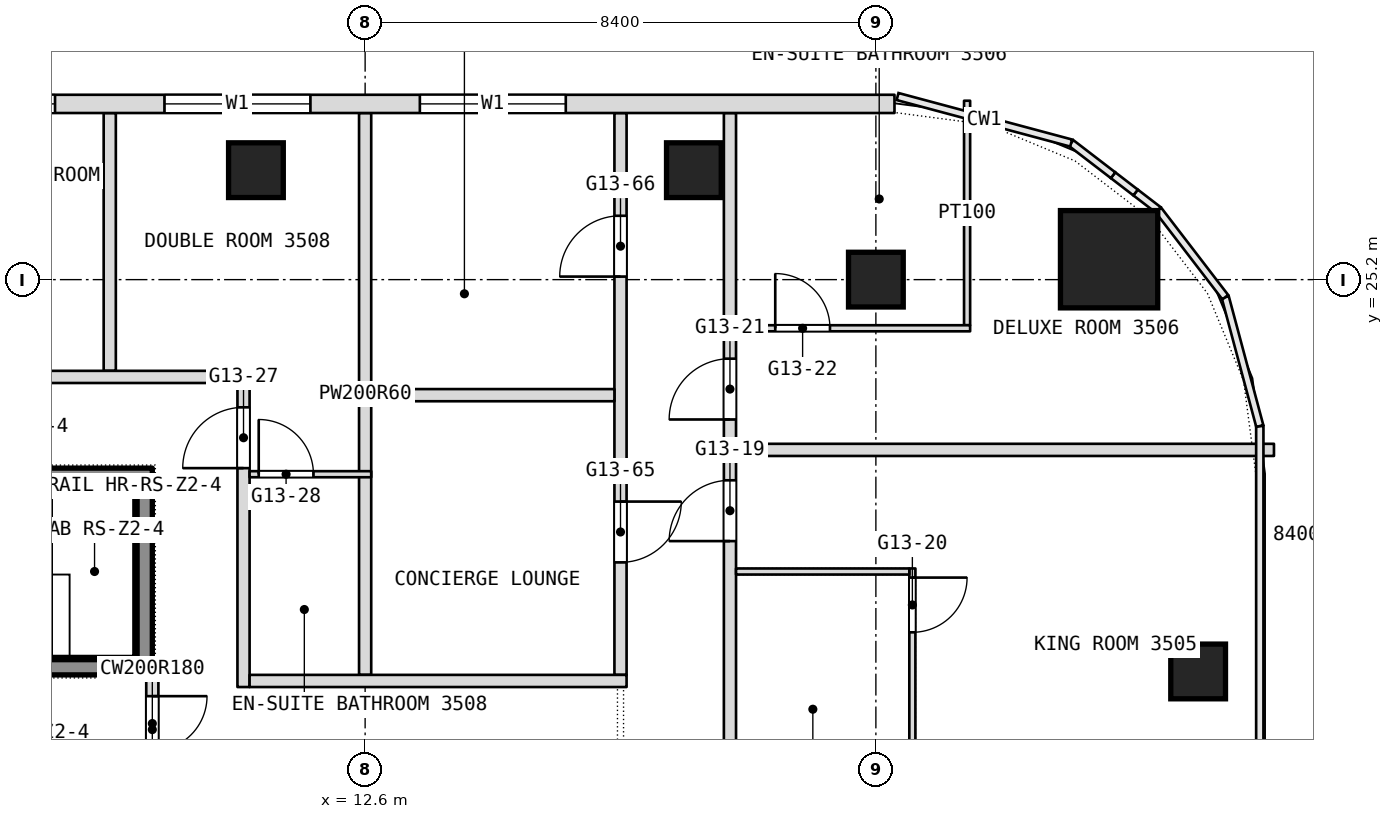
"""IFC4 building model, lengths in metres.
Left out: names, types, materials, properties, quantities, classifications, styles, units other than length and angle.
Written with IfcOpenShell. Run it as: python <this file> out.ifc"""

import sys

from ifc_helpers import new_model, si_unit, direction, frame, frame_2d, origin, origin_2d, place, context, subcontext, project, spatial, rectangle, extrude, element, fill, save


model = new_model("IFC4")
c1 = context("Model", 3, precision=1e-05, world=origin(), true_north=direction((0.0, 1.0)))
c2 = subcontext(c1, "Body", "Model", "MODEL_VIEW")
j1 = project(units=[si_unit("LENGTHUNIT", "METRE"), si_unit("PLANEANGLEUNIT", "RADIAN")], contexts=[c1])
p1 = place(None, origin())
s1 = spatial("IfcSite", under=j1, at=p1, CompositionType="ELEMENT")
p2 = place(p1, origin())
s2 = spatial("IfcBuilding", under=s1, at=p2, CompositionType="ELEMENT")
p3 = place(p2, frame((0.0, 0.0, 151.7)))
s3 = spatial("IfcBuildingStorey", under=s2, at=p3, CompositionType="ELEMENT", Elevation=151.7)
p4 = place(p3, frame((24.835, 25.535, 0.0), z_axis=(0.0, 0.0, 1.0), x_axis=(1.0, 0.0, 0.0)))
e1 = element("IfcColumn", 1, at=p4, inside=s3, PredefinedType="COLUMN", context=c2, shape_type="SweptSolid", body=[
    extrude(rectangle(XDim=1.6, YDim=1.6, at=origin_2d()), origin(), (0.0, 0.0, 1.0), 3.6),
])
for number, where, z_axis, x_axis in (
    (2, (21.0, 25.2, 0.0), (0.0, 0.0, 1.0), (1.0, 0.0, 0.0)),
    (3, (10.804, 27.0, 0.0), (0.0, 0.0, 1.0), (1.0, 0.0, 0.0)),
    (4, (18.007, 27.0, 0.0), (0.0, 0.0, 1.0), (1.0, 0.0, 0.0)),
    (5, (26.3, 18.756, 0.0), (0.0, 0.0, 1.0), (1.0, 0.0, 0.0)),
):
    element("IfcColumn", number, at=place(p3, frame(where, z_axis=z_axis, x_axis=x_axis)), inside=s3, PredefinedType="COLUMN", context=c2, shape_type="SweptSolid", body=[
        extrude(rectangle(XDim=0.9, YDim=0.9, at=origin_2d()), origin(), (0.0, 0.0, 1.0), 3.6),
    ])
p5 = place(p3, frame((22.5, 24.45, 0.0), z_axis=(0.0, 0.0, 1.0), x_axis=(0.0, 1.0, 0.0)))
e6 = element("IfcWall", 6, at=p5, inside=s3, PredefinedType="PARTITIONING", context=c2, shape_type="SweptSolid", body=[
    extrude(rectangle(XDim=3.692, YDim=0.1, at=frame_2d((1.846, 0.0))), origin(), (0.0, 0.0, 1.0), 3.34),
])
p6 = place(p3, frame((21.6, 16.9, 0.0), z_axis=(0.0, 0.0, 1.0), x_axis=(0.0, 1.0, 0.0)))
e7 = element("IfcWall", 7, at=p6, inside=s3, PredefinedType="PARTITIONING", context=c2, shape_type="SweptSolid", body=[
    extrude(rectangle(XDim=3.55, YDim=0.1, at=frame_2d((1.775, 0.0))), origin(), (0.0, 0.0, 1.0), 3.34),
])
p7 = place(p6, frame((2.5, 0.0, 0.0)))
e8 = element("IfcOpeningElement", 8, at=p7, cuts=e7, PredefinedType="OPENING", context=c2, shape_type="SweptSolid", body=[
    extrude(rectangle(XDim=0.9, YDim=2.1, at=frame_2d((0.45, 1.05))), frame((0.0, 0.05, 0.0), z_axis=(0.0, -1.0, 0.0), x_axis=(1.0, 0.0, 0.0)), (0.0, 0.0, 1.0), 0.1),
])
p8 = place(p3, frame((18.6, -21.708, 0.0), z_axis=(0.0, 0.0, 1.0), x_axis=(0.0, 1.0, 0.0)))
e9 = element("IfcWall", 9, at=p8, inside=s3, PredefinedType="PARTITIONING", context=c2, shape_type="SweptSolid", body=[
    extrude(rectangle(XDim=49.648, YDim=0.2, at=frame_2d((24.824, 0.0))), origin(), (0.0, 0.0, 1.0), 3.34),
])
p9 = place(p8, frame((2.8, 0.0, 0.0)))
e10 = element("IfcOpeningElement", 10, at=p9, cuts=e9, PredefinedType="OPENING", context=c2, shape_type="SweptSolid", body=[
    extrude(rectangle(XDim=1.0, YDim=2.1, at=frame_2d((0.5, 1.05))), frame((0.0, 0.1, 0.0), z_axis=(0.0, -1.0, 0.0), x_axis=(1.0, 0.0, 0.0)), (0.0, 0.0, 1.0), 0.2),
])
p10 = place(p8, frame((10.658, 0.0, 0.0)))
e11 = element("IfcOpeningElement", 11, at=p10, cuts=e9, PredefinedType="OPENING", context=c2, shape_type="SweptSolid", body=[
    extrude(rectangle(XDim=1.1, YDim=2.1, at=frame_2d((0.55, 1.05))), frame((0.0, 0.1, 0.0), z_axis=(0.0, -1.0, 0.0), x_axis=(1.0, 0.0, 0.0)), (0.0, 0.0, 1.0), 0.2),
])
p11 = place(p8, frame((16.608, 0.0, 0.0)))
e12 = element("IfcOpeningElement", 12, at=p11, cuts=e9, PredefinedType="OPENING", context=c2, shape_type="SweptSolid", body=[
    extrude(rectangle(XDim=1.8, YDim=2.1, at=frame_2d((0.9, 1.05))), frame((0.0, 0.1, 0.0), z_axis=(0.0, -1.0, 0.0), x_axis=(1.0, 0.0, 0.0)), (0.0, 0.0, 1.0), 0.2),
])
p12 = place(p8, frame((24.508, 0.0, 0.0)))
e13 = element("IfcOpeningElement", 13, at=p12, cuts=e9, PredefinedType="OPENING", context=c2, shape_type="SweptSolid", body=[
    extrude(rectangle(XDim=1.0, YDim=2.1, at=frame_2d((0.5, 1.05))), frame((0.0, 0.1, 0.0), z_axis=(0.0, -1.0, 0.0), x_axis=(1.0, 0.0, 0.0)), (0.0, 0.0, 1.0), 0.2),
])
p13 = place(p8, frame((26.308, 0.0, 0.0)))
e14 = element("IfcOpeningElement", 14, at=p13, cuts=e9, PredefinedType="OPENING", context=c2, shape_type="SweptSolid", body=[
    extrude(rectangle(XDim=1.0, YDim=2.1, at=frame_2d((0.5, 1.05))), frame((0.0, 0.1, 0.0), z_axis=(0.0, -1.0, 0.0), x_axis=(1.0, 0.0, 0.0)), (0.0, 0.0, 1.0), 0.2),
])
p14 = place(p8, frame((33.408, 0.0, 0.0)))
e15 = element("IfcOpeningElement", 15, at=p14, cuts=e9, PredefinedType="OPENING", context=c2, shape_type="SweptSolid", body=[
    extrude(rectangle(XDim=1.8, YDim=2.1, at=frame_2d((0.9, 1.05))), frame((0.0, 0.1, 0.0), z_axis=(0.0, -1.0, 0.0), x_axis=(1.0, 0.0, 0.0)), (0.0, 0.0, 1.0), 0.2),
])
p15 = place(p8, frame((42.608, 0.0, 0.0)))
e16 = element("IfcOpeningElement", 16, at=p15, cuts=e9, PredefinedType="OPENING", context=c2, shape_type="SweptSolid", body=[
    extrude(rectangle(XDim=1.0, YDim=2.1, at=frame_2d((0.5, 1.05))), frame((0.0, 0.1, 0.0), z_axis=(0.0, -1.0, 0.0), x_axis=(1.0, 0.0, 0.0)), (0.0, 0.0, 1.0), 0.2),
])
p16 = place(p8, frame((44.608, 0.0, 0.0)))
e17 = element("IfcOpeningElement", 17, at=p16, cuts=e9, PredefinedType="OPENING", context=c2, shape_type="SweptSolid", body=[
    extrude(rectangle(XDim=1.0, YDim=2.1, at=frame_2d((0.5, 1.05))), frame((0.0, 0.1, 0.0), z_axis=(0.0, -1.0, 0.0), x_axis=(1.0, 0.0, 0.0)), (0.0, 0.0, 1.0), 0.2),
])
p17 = place(p3, frame((16.8, 18.7, 0.0), z_axis=(0.0, 0.0, 1.0), x_axis=(0.0, 1.0, 0.0)))
e18 = element("IfcWall", 18, at=p17, inside=s3, PredefinedType="PARTITIONING", context=c2, shape_type="SweptSolid", body=[
    extrude(rectangle(XDim=9.24, YDim=0.2, at=frame_2d((4.62, 0.0))), origin(), (0.0, 0.0, 1.0), 3.34),
])
p18 = place(p17, frame((1.85, 0.0, 0.0)))
e19 = element("IfcOpeningElement", 19, at=p18, cuts=e18, PredefinedType="OPENING", context=c2, shape_type="SweptSolid", body=[
    extrude(rectangle(XDim=1.0, YDim=2.1, at=frame_2d((0.5, 1.05))), frame((0.0, 0.1, 0.0), z_axis=(0.0, -1.0, 0.0), x_axis=(1.0, 0.0, 0.0)), (0.0, 0.0, 1.0), 0.2),
])
p19 = place(p17, frame((6.55, 0.0, 0.0)))
e20 = element("IfcOpeningElement", 20, at=p19, cuts=e18, PredefinedType="OPENING", context=c2, shape_type="SweptSolid", body=[
    extrude(rectangle(XDim=1.0, YDim=2.1, at=frame_2d((0.5, 1.05))), frame((0.0, 0.1, 0.0), z_axis=(0.0, -1.0, 0.0), x_axis=(1.0, 0.0, 0.0)), (0.0, 0.0, 1.0), 0.2),
])
p20 = place(p3, frame((12.6, 18.7, 0.0), z_axis=(0.0, 0.0, 1.0), x_axis=(0.0, 1.0, 0.0)))
e21 = element("IfcWall", 21, at=p20, inside=s3, PredefinedType="PARTITIONING", context=c2, shape_type="SweptSolid", body=[
    extrude(rectangle(XDim=9.24, YDim=0.2, at=frame_2d((4.62, 0.0))), origin(), (0.0, 0.0, 1.0), 3.34),
])
p21 = place(p3, frame((10.6, 18.5, 0.0), z_axis=(0.0, 0.0, 1.0), x_axis=(0.0, 1.0, 0.0)))
e22 = element("IfcWall", 22, at=p21, inside=s3, PredefinedType="PARTITIONING", context=c2, shape_type="SweptSolid", body=[
    extrude(rectangle(XDim=5.0, YDim=0.2, at=frame_2d((2.5, 0.0))), origin(), (0.0, 0.0, 1.0), 3.34),
])
p22 = place(p21, frame((3.6, 0.0, 0.0)))
e23 = element("IfcOpeningElement", 23, at=p22, cuts=e22, PredefinedType="OPENING", context=c2, shape_type="SweptSolid", body=[
    extrude(rectangle(XDim=1.0, YDim=2.1, at=frame_2d((0.5, 1.05))), frame((0.0, 0.1, 0.0), z_axis=(0.0, -1.0, 0.0), x_axis=(1.0, 0.0, 0.0)), (0.0, 0.0, 1.0), 0.2),
])
p23 = place(p3, frame((9.1, 16.9, 0.0), z_axis=(0.0, 0.0, 1.0), x_axis=(0.0, 1.0, 0.0)))
e24 = element("IfcWall", 24, at=p23, inside=s3, PredefinedType="PARTITIONING", context=c2, shape_type="SweptSolid", body=[
    extrude(rectangle(XDim=1.8, YDim=0.2, at=frame_2d((0.9, 0.0))), origin(), (0.0, 0.0, 1.0), 3.34),
])
p24 = place(p23, frame((0.55, 0.0, 0.0)))
e25 = element("IfcOpeningElement", 25, at=p24, cuts=e24, PredefinedType="OPENING", context=c2, shape_type="SweptSolid", body=[
    extrude(rectangle(XDim=0.9, YDim=2.1, at=frame_2d((0.45, 1.05))), frame((0.0, 0.1, 0.0), z_axis=(0.0, -1.0, 0.0), x_axis=(1.0, 0.0, 0.0)), (0.0, 0.0, 1.0), 0.2),
])
p25 = place(p3, frame((8.4, 23.7, 0.0), z_axis=(0.0, 0.0, 1.0), x_axis=(0.0, 1.0, 0.0)))
e26 = element("IfcWall", 26, at=p25, inside=s3, PredefinedType="PARTITIONING", context=c2, shape_type="SweptSolid", body=[
    extrude(rectangle(XDim=4.24, YDim=0.2, at=frame_2d((2.12, 0.0))), origin(), (0.0, 0.0, 1.0), 3.34),
])
p26 = place(p3, frame((10.7, 18.6, 0.0), z_axis=(0.0, 0.0, 1.0), x_axis=(1.0, 0.0, 0.0)))
e27 = element("IfcWall", 27, at=p26, inside=s3, PredefinedType="PARTITIONING", context=c2, shape_type="SweptSolid", body=[
    extrude(rectangle(XDim=6.2, YDim=0.2, at=frame_2d((3.1, 0.0))), origin(), (0.0, 0.0, 1.0), 3.34),
])
p27 = place(p3, frame((18.7, 20.4, 0.0), z_axis=(0.0, 0.0, 1.0), x_axis=(1.0, 0.0, 0.0)))
e28 = element("IfcWall", 28, at=p27, inside=s3, PredefinedType="PARTITIONING", context=c2, shape_type="SweptSolid", body=[
    extrude(rectangle(XDim=2.85, YDim=0.1, at=frame_2d((1.425, 0.0))), origin(), (0.0, 0.0, 1.0), 3.34),
])
p28 = place(p3, frame((10.7, 22.0, 0.0), z_axis=(0.0, 0.0, 1.0), x_axis=(1.0, 0.0, 0.0)))
e29 = element("IfcWall", 29, at=p28, inside=s3, PredefinedType="PARTITIONING", context=c2, shape_type="SweptSolid", body=[
    extrude(rectangle(XDim=2.0, YDim=0.1, at=frame_2d((1.0, 0.0))), origin(), (0.0, 0.0, 1.0), 3.34),
])
p29 = place(p28, frame((0.15, 0.0, 0.0)))
e30 = element("IfcOpeningElement", 30, at=p29, cuts=e29, PredefinedType="OPENING", context=c2, shape_type="SweptSolid", body=[
    extrude(rectangle(XDim=0.9, YDim=2.1, at=frame_2d((0.45, 1.05))), frame((0.0, 0.05, 0.0), z_axis=(0.0, -1.0, 0.0), x_axis=(1.0, 0.0, 0.0)), (0.0, 0.0, 1.0), 0.1),
])
p30 = place(p3, frame((18.7, 22.4, 0.0), z_axis=(0.0, 0.0, 1.0), x_axis=(1.0, 0.0, 0.0)))
e31 = element("IfcWall", 31, at=p30, inside=s3, PredefinedType="PARTITIONING", context=c2, shape_type="SweptSolid", body=[
    extrude(rectangle(XDim=8.847, YDim=0.2, at=frame_2d((4.424, 0.0))), origin(), (0.0, 0.0, 1.0), 3.34),
])
p31 = place(p3, frame((12.7, 23.3, 0.0), z_axis=(0.0, 0.0, 1.0), x_axis=(1.0, 0.0, 0.0)))
e32 = element("IfcWall", 32, at=p31, inside=s3, PredefinedType="PARTITIONING", context=c2, shape_type="SweptSolid", body=[
    extrude(rectangle(XDim=4.0, YDim=0.2, at=frame_2d((2.0, 0.0))), origin(), (0.0, 0.0, 1.0), 3.34),
])
p32 = place(p3, frame((1.5, 23.6, 0.0), z_axis=(0.0, 0.0, 1.0), x_axis=(1.0, 0.0, 0.0)))
e33 = element("IfcWall", 33, at=p32, inside=s3, PredefinedType="PARTITIONING", context=c2, shape_type="SweptSolid", body=[
    extrude(rectangle(XDim=9.2, YDim=0.2, at=frame_2d((4.6, 0.0))), origin(), (0.0, 0.0, 1.0), 3.34),
])
p33 = place(p32, frame((4.3, 0.0, 0.0)))
e34 = element("IfcOpeningElement", 34, at=p33, cuts=e33, PredefinedType="OPENING", context=c2, shape_type="SweptSolid", body=[
    extrude(rectangle(XDim=1.0, YDim=2.1, at=frame_2d((0.5, 1.05))), frame((0.0, 0.1, 0.0), z_axis=(0.0, -1.0, 0.0), x_axis=(1.0, 0.0, 0.0)), (0.0, 0.0, 1.0), 0.2),
])
p34 = place(p3, frame((18.7, 24.4, 0.0), z_axis=(0.0, 0.0, 1.0), x_axis=(1.0, 0.0, 0.0)))
e35 = element("IfcWall", 35, at=p34, inside=s3, PredefinedType="PARTITIONING", context=c2, shape_type="SweptSolid", body=[
    extrude(rectangle(XDim=3.85, YDim=0.1, at=frame_2d((1.925, 0.0))), origin(), (0.0, 0.0, 1.0), 3.34),
])
p35 = place(p34, frame((0.645, 0.0, 0.0)))
e36 = element("IfcOpeningElement", 36, at=p35, cuts=e35, PredefinedType="OPENING", context=c2, shape_type="SweptSolid", body=[
    extrude(rectangle(XDim=0.9, YDim=2.1, at=frame_2d((0.45, 1.05))), frame((0.0, 0.05, 0.0), z_axis=(0.0, -1.0, 0.0), x_axis=(1.0, 0.0, 0.0)), (0.0, 0.0, 1.0), 0.1),
])
p36 = place(p3, frame((21.306, 28.09, 0.0), z_axis=(0.0, 0.0, 1.0), x_axis=(-1.0, 0.0, 0.0)))
e37 = element("IfcWall", 37, at=p36, inside=s3, PredefinedType="NOTDEFINED", context=c2, shape_type="SweptSolid", body=[
    extrude(rectangle(XDim=42.612, YDim=0.3, at=frame_2d((21.306, 0.0))), origin(), (0.0, 0.0, 1.0), 3.6),
])
p37 = place(p36, frame((5.406, 0.0, 0.9)))
e38 = element("IfcOpeningElement", 38, at=p37, cuts=e37, PredefinedType="OPENING", context=c2, shape_type="SweptSolid", body=[
    extrude(rectangle(XDim=2.4, YDim=2.1, at=frame_2d((1.2, 1.05))), frame((0.0, 0.15, 0.0), z_axis=(0.0, -1.0, 0.0), x_axis=(1.0, 0.0, 0.0)), (0.0, 0.0, 1.0), 0.3),
])
p38 = place(p36, frame((9.606, 0.0, 0.9)))
e39 = element("IfcOpeningElement", 39, at=p38, cuts=e37, PredefinedType="OPENING", context=c2, shape_type="SweptSolid", body=[
    extrude(rectangle(XDim=2.4, YDim=2.1, at=frame_2d((1.2, 1.05))), frame((0.0, 0.15, 0.0), z_axis=(0.0, -1.0, 0.0), x_axis=(1.0, 0.0, 0.0)), (0.0, 0.0, 1.0), 0.3),
])
p39 = place(p36, frame((13.806, 0.0, 0.9)))
e40 = element("IfcOpeningElement", 40, at=p39, cuts=e37, PredefinedType="OPENING", context=c2, shape_type="SweptSolid", body=[
    extrude(rectangle(XDim=2.4, YDim=2.1, at=frame_2d((1.2, 1.05))), frame((0.0, 0.15, 0.0), z_axis=(0.0, -1.0, 0.0), x_axis=(1.0, 0.0, 0.0)), (0.0, 0.0, 1.0), 0.3),
])
p40 = place(p36, frame((18.006, 0.0, 0.9)))
e41 = element("IfcOpeningElement", 41, at=p40, cuts=e37, PredefinedType="OPENING", context=c2, shape_type="SweptSolid", body=[
    extrude(rectangle(XDim=2.4, YDim=2.1, at=frame_2d((1.2, 1.05))), frame((0.0, 0.15, 0.0), z_axis=(0.0, -1.0, 0.0), x_axis=(1.0, 0.0, 0.0)), (0.0, 0.0, 1.0), 0.3),
])
p41 = place(p36, frame((22.206, 0.0, 0.9)))
e42 = element("IfcOpeningElement", 42, at=p41, cuts=e37, PredefinedType="OPENING", context=c2, shape_type="SweptSolid", body=[
    extrude(rectangle(XDim=2.4, YDim=2.1, at=frame_2d((1.2, 1.05))), frame((0.0, 0.15, 0.0), z_axis=(0.0, -1.0, 0.0), x_axis=(1.0, 0.0, 0.0)), (0.0, 0.0, 1.0), 0.3),
])
p42 = place(p36, frame((26.406, 0.0, 0.9)))
e43 = element("IfcOpeningElement", 43, at=p42, cuts=e37, PredefinedType="OPENING", context=c2, shape_type="SweptSolid", body=[
    extrude(rectangle(XDim=2.4, YDim=2.1, at=frame_2d((1.2, 1.05))), frame((0.0, 0.15, 0.0), z_axis=(0.0, -1.0, 0.0), x_axis=(1.0, 0.0, 0.0)), (0.0, 0.0, 1.0), 0.3),
])
p43 = place(p36, frame((30.606, 0.0, 0.9)))
e44 = element("IfcOpeningElement", 44, at=p43, cuts=e37, PredefinedType="OPENING", context=c2, shape_type="SweptSolid", body=[
    extrude(rectangle(XDim=2.4, YDim=2.1, at=frame_2d((1.2, 1.05))), frame((0.0, 0.15, 0.0), z_axis=(0.0, -1.0, 0.0), x_axis=(1.0, 0.0, 0.0)), (0.0, 0.0, 1.0), 0.3),
])
p44 = place(p36, frame((34.806, 0.0, 0.9)))
e45 = element("IfcOpeningElement", 45, at=p44, cuts=e37, PredefinedType="OPENING", context=c2, shape_type="SweptSolid", body=[
    extrude(rectangle(XDim=2.4, YDim=2.1, at=frame_2d((1.2, 1.05))), frame((0.0, 0.15, 0.0), z_axis=(0.0, -1.0, 0.0), x_axis=(1.0, 0.0, 0.0)), (0.0, 0.0, 1.0), 0.3),
])
p45 = place(p3, frame((2.9, 18.825, 0.1), z_axis=(0.0, 0.0, 1.0), x_axis=(1.0, 0.0, 0.0)))
e46 = element("IfcWall", 46, at=p45, inside=s3, PredefinedType="SHEAR", context=c2, shape_type="SweptSolid", body=[
    extrude(rectangle(XDim=6.2, YDim=0.25, at=frame_2d((3.1, 0.0))), origin(), (0.0, 0.0, 1.0), 3.6),
])
p46 = place(p45, frame((0.45, 0.0, 0.0)))
e47 = element("IfcOpeningElement", 47, at=p46, cuts=e46, PredefinedType="OPENING", context=c2, shape_type="SweptSolid", body=[
    extrude(rectangle(XDim=1.0, YDim=2.1, at=frame_2d((0.5, 1.05))), frame((0.0, 0.125, 0.0), z_axis=(0.0, -1.0, 0.0), x_axis=(1.0, 0.0, 0.0)), (0.0, 0.0, 1.0), 0.25),
])
p47 = place(p3, frame((2.9, 21.975, 0.1), z_axis=(0.0, 0.0, 1.0), x_axis=(1.0, 0.0, 0.0)))
e48 = element("IfcWall", 48, at=p47, inside=s3, PredefinedType="SHEAR", context=c2, shape_type="SweptSolid", body=[
    extrude(rectangle(XDim=6.2, YDim=0.25, at=frame_2d((3.1, 0.0))), origin(), (0.0, 0.0, 1.0), 3.6),
])
p48 = place(p3, frame((8.975, 18.95, 0.1), z_axis=(0.0, 0.0, 1.0), x_axis=(0.0, 1.0, 0.0)))
e49 = element("IfcWall", 49, at=p48, inside=s3, PredefinedType="SHEAR", context=c2, shape_type="SweptSolid", body=[
    extrude(rectangle(XDim=2.9, YDim=0.25, at=frame_2d((1.45, 0.0))), origin(), (0.0, 0.0, 1.0), 3.6),
])
p49 = place(p7, origin())
e50 = element("IfcDoor", 50, at=p49, inside=s3, OperationType="SINGLE_SWING_RIGHT", PredefinedType="DOOR", context=c2, shape_type="SweptSolid", body=[
    extrude(rectangle(XDim=0.9, YDim=2.1, at=frame_2d((0.45, 1.05))), frame((0.0, 0.025, 0.0), z_axis=(0.0, -1.0, 0.0), x_axis=(1.0, 0.0, 0.0)), (0.0, 0.0, 1.0), 0.05),
])
fill(e8, e50)
p50 = place(p15, origin())
e51 = element("IfcDoor", 51, at=p50, inside=s3, OperationType="SINGLE_SWING_LEFT", PredefinedType="DOOR", context=c2, shape_type="SweptSolid", body=[
    extrude(rectangle(XDim=1.0, YDim=2.1, at=frame_2d((0.5, 1.05))), frame((0.0, 0.025, 0.0), z_axis=(0.0, -1.0, 0.0), x_axis=(1.0, 0.0, 0.0)), (0.0, 0.0, 1.0), 0.05),
])
fill(e16, e51)
p51 = place(p16, origin())
e52 = element("IfcDoor", 52, at=p51, inside=s3, OperationType="SINGLE_SWING_LEFT", PredefinedType="DOOR", context=c2, shape_type="SweptSolid", body=[
    extrude(rectangle(XDim=1.0, YDim=2.1, at=frame_2d((0.5, 1.05))), frame((0.0, 0.025, 0.0), z_axis=(0.0, -1.0, 0.0), x_axis=(1.0, 0.0, 0.0)), (0.0, 0.0, 1.0), 0.05),
])
fill(e17, e52)
p52 = place(p18, origin())
e53 = element("IfcDoor", 53, at=p52, inside=s3, OperationType="SINGLE_SWING_LEFT", PredefinedType="DOOR", context=c2, shape_type="SweptSolid", body=[
    extrude(rectangle(XDim=1.0, YDim=2.1, at=frame_2d((0.5, 1.05))), frame((0.0, 0.025, 0.0), z_axis=(0.0, -1.0, 0.0), x_axis=(1.0, 0.0, 0.0)), (0.0, 0.0, 1.0), 0.05),
])
fill(e19, e53)
p53 = place(p19, origin())
e54 = element("IfcDoor", 54, at=p53, inside=s3, OperationType="SINGLE_SWING_LEFT", PredefinedType="DOOR", context=c2, shape_type="SweptSolid", body=[
    extrude(rectangle(XDim=1.0, YDim=2.1, at=frame_2d((0.5, 1.05))), frame((0.0, 0.025, 0.0), z_axis=(0.0, -1.0, 0.0), x_axis=(1.0, 0.0, 0.0)), (0.0, 0.0, 1.0), 0.05),
])
fill(e20, e54)
p54 = place(p22, origin())
e55 = element("IfcDoor", 55, at=p54, inside=s3, OperationType="SINGLE_SWING_LEFT", PredefinedType="DOOR", context=c2, shape_type="SweptSolid", body=[
    extrude(rectangle(XDim=1.0, YDim=2.1, at=frame_2d((0.5, 1.05))), frame((0.0, 0.025, 0.0), z_axis=(0.0, -1.0, 0.0), x_axis=(1.0, 0.0, 0.0)), (0.0, 0.0, 1.0), 0.05),
])
fill(e23, e55)
p55 = place(p24, origin())
e56 = element("IfcDoor", 56, at=p55, inside=s3, OperationType="SINGLE_SWING_RIGHT", PredefinedType="DOOR", context=c2, shape_type="SweptSolid", body=[
    extrude(rectangle(XDim=0.9, YDim=2.1, at=frame_2d((0.45, 1.05))), frame((0.0, 0.025, 0.0), z_axis=(0.0, -1.0, 0.0), x_axis=(1.0, 0.0, 0.0)), (0.0, 0.0, 1.0), 0.05),
])
fill(e25, e56)
p56 = place(p29, origin())
e57 = element("IfcDoor", 57, at=p56, inside=s3, OperationType="SINGLE_SWING_RIGHT", PredefinedType="DOOR", context=c2, shape_type="SweptSolid", body=[
    extrude(rectangle(XDim=0.9, YDim=2.1, at=frame_2d((0.45, 1.05))), frame((0.0, 0.025, 0.0), z_axis=(0.0, -1.0, 0.0), x_axis=(1.0, 0.0, 0.0)), (0.0, 0.0, 1.0), 0.05),
])
fill(e30, e57)
p57 = place(p35, origin())
e58 = element("IfcDoor", 58, at=p57, inside=s3, OperationType="SINGLE_SWING_RIGHT", PredefinedType="DOOR", context=c2, shape_type="SweptSolid", body=[
    extrude(rectangle(XDim=0.9, YDim=2.1, at=frame_2d((0.45, 1.05))), frame((0.0, 0.025, 0.0), z_axis=(0.0, -1.0, 0.0), x_axis=(1.0, 0.0, 0.0)), (0.0, 0.0, 1.0), 0.05),
])
fill(e36, e58)
p58 = place(p37, origin())
e59 = element("IfcWindow", 59, at=p58, inside=s3, PartitioningType="SINGLE_PANEL", PredefinedType="WINDOW", context=c2, shape_type="SweptSolid", body=[
    extrude(rectangle(XDim=2.4, YDim=2.1, at=frame_2d((1.2, 1.05))), frame((0.0, 0.03, 0.0), z_axis=(0.0, -1.0, 0.0), x_axis=(1.0, 0.0, 0.0)), (0.0, 0.0, 1.0), 0.06),
])
fill(e38, e59)
p59 = place(p38, origin())
e60 = element("IfcWindow", 60, at=p59, inside=s3, PartitioningType="SINGLE_PANEL", PredefinedType="WINDOW", context=c2, shape_type="SweptSolid", body=[
    extrude(rectangle(XDim=2.4, YDim=2.1, at=frame_2d((1.2, 1.05))), frame((0.0, 0.03, 0.0), z_axis=(0.0, -1.0, 0.0), x_axis=(1.0, 0.0, 0.0)), (0.0, 0.0, 1.0), 0.06),
])
fill(e39, e60)
p60 = place(p39, origin())
e61 = element("IfcWindow", 61, at=p60, inside=s3, PartitioningType="SINGLE_PANEL", PredefinedType="WINDOW", context=c2, shape_type="SweptSolid", body=[
    extrude(rectangle(XDim=2.4, YDim=2.1, at=frame_2d((1.2, 1.05))), frame((0.0, 0.03, 0.0), z_axis=(0.0, -1.0, 0.0), x_axis=(1.0, 0.0, 0.0)), (0.0, 0.0, 1.0), 0.06),
])
fill(e40, e61)
save(model, sys.argv[1])
